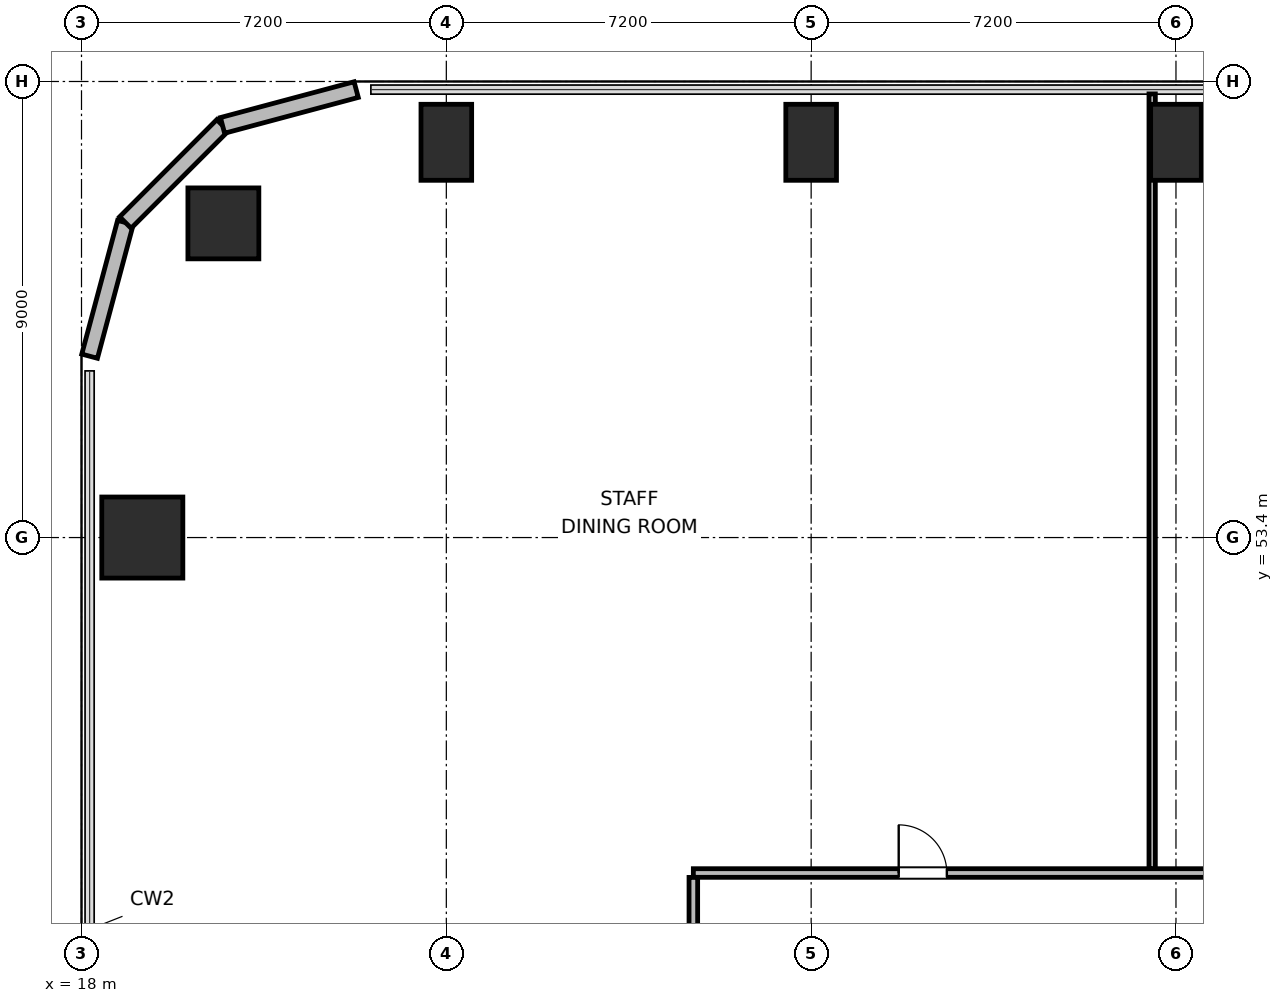
"""IFC4 building model, lengths in metres.
Left out: names, types, materials, properties, quantities, classifications, styles, units other than length and angle.
Written with IfcOpenShell. Run it as: python <this file> out.ifc"""

import sys

from ifc_helpers import new_model, si_unit, direction, frame, frame_2d, origin, origin_2d, place, context, subcontext, project, spatial, rectangle, circle, extrude, element, fill, save


model = new_model("IFC4")
c1 = context("Model", 3, precision=1e-05, world=origin(), true_north=direction((0.0, 1.0)))
c2 = subcontext(c1, "Body", "Model", "MODEL_VIEW")
j1 = project(units=[si_unit("LENGTHUNIT", "METRE"), si_unit("PLANEANGLEUNIT", "RADIAN")], contexts=[c1])
p1 = place(None, origin())
s1 = spatial("IfcSite", under=j1, at=p1, CompositionType="ELEMENT")
p2 = place(p1, origin())
s2 = spatial("IfcBuilding", under=s1, at=p2, CompositionType="ELEMENT")
p3 = place(p2, frame((0.0, 0.0, 33.3)))
s3 = spatial("IfcBuildingStorey", under=s2, at=p3, CompositionType="ELEMENT", Elevation=33.3)
p4 = place(p3, frame((20.8, 59.6, 0.0), z_axis=(0.0, 0.0, 1.0), x_axis=(1.0, 0.0, 0.0)))
e1 = element("IfcColumn", 1, at=p4, inside=s3, PredefinedType="COLUMN", context=c2, shape_type="SweptSolid", body=[
    extrude(circle(Radius=0.7, at=origin_2d()), origin(), (0.0, 0.0, 1.0), 3.9),
])
for number, where, z_axis, x_axis in (
    (2, (25.2, 61.2, 0.0), (0.0, 0.0, 1.0), (1.0, 0.0, 0.0)),
    (3, (32.4, 61.2, 0.0), (0.0, 0.0, 1.0), (1.0, 0.0, 0.0)),
    (4, (39.6, 61.2, 0.0), (0.0, 0.0, 1.0), (1.0, 0.0, 0.0)),
):
    element("IfcColumn", number, at=place(p3, frame(where, z_axis=z_axis, x_axis=x_axis)), inside=s3, PredefinedType="COLUMN", context=c2, shape_type="SweptSolid", body=[
        extrude(rectangle(XDim=1.0, YDim=1.5, at=origin_2d()), origin(), (0.0, 0.0, 1.0), 3.9),
    ])
p5 = place(p3, frame((19.2, 53.4, 0.0), z_axis=(0.0, 0.0, 1.0), x_axis=(1.0, 0.0, 0.0)))
e5 = element("IfcColumn", 5, at=p5, inside=s3, PredefinedType="COLUMN", context=c2, shape_type="SweptSolid", body=[
    extrude(rectangle(XDim=1.6, YDim=1.6, at=origin_2d()), origin(), (0.0, 0.0, 1.0), 3.9),
])
p6 = place(p3, frame((18.16, 56.979, 0.0), z_axis=(0.0, 0.0, 1.0), x_axis=(0.25869736047, 0.965958423373, 0.0)))
e6 = element("IfcWall", 6, at=p6, inside=s3, PredefinedType="SOLIDWALL", context=c2, shape_type="SweptSolid", body=[
    extrude(rectangle(XDim=2.731, YDim=0.32, at=frame_2d((1.366, 0.0))), origin(), (0.0, 0.0, 1.0), 3.64),
])
p7 = place(p3, frame((18.866, 59.617, 0.0), z_axis=(0.0, 0.0, 1.0), x_axis=(0.707106781187, 0.707106781187, 0.0)))
e7 = element("IfcWall", 7, at=p7, inside=s3, PredefinedType="SOLIDWALL", context=c2, shape_type="SweptSolid", body=[
    extrude(rectangle(XDim=2.71, YDim=0.32, at=frame_2d((1.355, 0.0))), origin(), (0.0, 0.0, 1.0), 3.64),
])
p8 = place(p3, frame((20.783, 61.533, 0.0), z_axis=(0.0, 0.0, 1.0), x_axis=(0.965964405026, 0.25867502435, 0.0)))
e8 = element("IfcWall", 8, at=p8, inside=s3, PredefinedType="SOLIDWALL", context=c2, shape_type="SweptSolid", body=[
    extrude(rectangle(XDim=2.731, YDim=0.32, at=frame_2d((1.366, 0.0))), origin(), (0.0, 0.0, 1.0), 3.64),
])
p9 = place(p3, frame((30.075, 46.78, 0.0), z_axis=(0.0, 0.0, 1.0), x_axis=(1.0, 0.0, 0.0)))
e9 = element("IfcWall", 9, at=p9, inside=s3, PredefinedType="PARTITIONING", context=c2, shape_type="SweptSolid", body=[
    extrude(rectangle(XDim=35.85, YDim=0.17, at=frame_2d((17.925, 0.0))), origin(), (0.0, 0.0, 1.0), 3.64),
])
p10 = place(p9, frame((4.053, 0.0, 0.0)))
e10 = element("IfcOpeningElement", 10, at=p10, cuts=e9, PredefinedType="OPENING", context=c2, shape_type="SweptSolid", body=[
    extrude(rectangle(XDim=0.95, YDim=2.04, at=frame_2d((0.475, 1.02))), frame((0.0, 0.095, 0.0), z_axis=(0.0, -1.0, 0.0), x_axis=(1.0, 0.0, 0.0)), (0.0, 0.0, 1.0), 0.19),
])
p11 = place(p9, frame((11.05, 0.0, 0.0)))
e11 = element("IfcOpeningElement", 11, at=p11, cuts=e9, PredefinedType="OPENING", context=c2, shape_type="SweptSolid", body=[
    extrude(rectangle(XDim=0.95, YDim=2.04, at=frame_2d((0.475, 1.02))), frame((0.0, 0.095, 0.0), z_axis=(0.0, -1.0, 0.0), x_axis=(1.0, 0.0, 0.0)), (0.0, 0.0, 1.0), 0.19),
])
p12 = place(p9, frame((16.55, 0.0, 0.0)))
e12 = element("IfcOpeningElement", 12, at=p12, cuts=e9, PredefinedType="OPENING", context=c2, shape_type="SweptSolid", body=[
    extrude(rectangle(XDim=0.95, YDim=2.04, at=frame_2d((0.475, 1.02))), frame((0.0, 0.095, 0.0), z_axis=(0.0, -1.0, 0.0), x_axis=(1.0, 0.0, 0.0)), (0.0, 0.0, 1.0), 0.19),
])
p13 = place(p9, frame((20.82, 0.0, 0.0)))
e13 = element("IfcOpeningElement", 13, at=p13, cuts=e9, PredefinedType="OPENING", context=c2, shape_type="SweptSolid", body=[
    extrude(rectangle(XDim=0.95, YDim=2.04, at=frame_2d((0.475, 1.02))), frame((0.0, 0.095, 0.0), z_axis=(0.0, -1.0, 0.0), x_axis=(1.0, 0.0, 0.0)), (0.0, 0.0, 1.0), 0.19),
])
p14 = place(p9, frame((25.985, 0.0, 0.0)))
e14 = element("IfcOpeningElement", 14, at=p14, cuts=e9, PredefinedType="OPENING", context=c2, shape_type="SweptSolid", body=[
    extrude(rectangle(XDim=0.95, YDim=2.04, at=frame_2d((0.475, 1.02))), frame((0.0, 0.095, 0.0), z_axis=(0.0, -1.0, 0.0), x_axis=(1.0, 0.0, 0.0)), (0.0, 0.0, 1.0), 0.19),
])
p15 = place(p9, frame((32.643, 0.0, 0.0)))
e15 = element("IfcOpeningElement", 15, at=p15, cuts=e9, PredefinedType="OPENING", context=c2, shape_type="SweptSolid", body=[
    extrude(rectangle(XDim=0.95, YDim=2.04, at=frame_2d((0.475, 1.02))), frame((0.0, 0.095, 0.0), z_axis=(0.0, -1.0, 0.0), x_axis=(1.0, 0.0, 0.0)), (0.0, 0.0, 1.0), 0.19),
])
p16 = place(p3, frame((30.075, 25.307, 0.0), z_axis=(0.0, 0.0, 1.0), x_axis=(0.0, 1.0, 0.0)))
e16 = element("IfcWall", 16, at=p16, inside=s3, PredefinedType="PARTITIONING", context=c2, shape_type="SweptSolid", body=[
    extrude(rectangle(XDim=21.386, YDim=0.17, at=frame_2d((10.693, 0.0))), origin(), (0.0, 0.0, 1.0), 3.64),
])
p17 = place(p16, frame((3.528, 0.0, 0.0)))
e17 = element("IfcOpeningElement", 17, at=p17, cuts=e16, PredefinedType="OPENING", context=c2, shape_type="SweptSolid", body=[
    extrude(rectangle(XDim=0.95, YDim=2.04, at=frame_2d((0.475, 1.02))), frame((0.0, 0.095, 0.0), z_axis=(0.0, -1.0, 0.0), x_axis=(1.0, 0.0, 0.0)), (0.0, 0.0, 1.0), 0.19),
])
p18 = place(p16, frame((10.818, 0.0, 0.0)))
e18 = element("IfcOpeningElement", 18, at=p18, cuts=e16, PredefinedType="OPENING", context=c2, shape_type="SweptSolid", body=[
    extrude(rectangle(XDim=0.95, YDim=2.04, at=frame_2d((0.475, 1.02))), frame((0.0, 0.095, 0.0), z_axis=(0.0, -1.0, 0.0), x_axis=(1.0, 0.0, 0.0)), (0.0, 0.0, 1.0), 0.19),
])
p19 = place(p16, frame((17.508, 0.0, 0.0)))
e19 = element("IfcOpeningElement", 19, at=p19, cuts=e16, PredefinedType="OPENING", context=c2, shape_type="SweptSolid", body=[
    extrude(rectangle(XDim=0.95, YDim=2.04, at=frame_2d((0.475, 1.02))), frame((0.0, 0.095, 0.0), z_axis=(0.0, -1.0, 0.0), x_axis=(1.0, 0.0, 0.0)), (0.0, 0.0, 1.0), 0.19),
])
p20 = place(p3, frame((39.13, 46.867, 0.0), z_axis=(0.0, 0.0, 1.0), x_axis=(0.0, 1.0, 0.0)))
e20 = element("IfcWall", 20, at=p20, inside=s3, PredefinedType="PARTITIONING", context=c2, shape_type="SweptSolid", body=[
    extrude(rectangle(XDim=15.288, YDim=0.125, at=frame_2d((7.644, 0.0))), origin(), (0.0, 0.0, 1.0), 3.64),
])
p21 = place(p10, origin())
e21 = element("IfcDoor", 21, at=p21, inside=s3, OperationType="SINGLE_SWING_LEFT", PredefinedType="DOOR", context=c2, shape_type="SweptSolid", body=[
    extrude(rectangle(XDim=0.95, YDim=2.04, at=frame_2d((0.475, 1.02))), frame((0.0, 0.025, 0.0), z_axis=(0.0, -1.0, 0.0), x_axis=(1.0, 0.0, 0.0)), (0.0, 0.0, 1.0), 0.05),
])
fill(e10, e21)
save(model, sys.argv[1])
